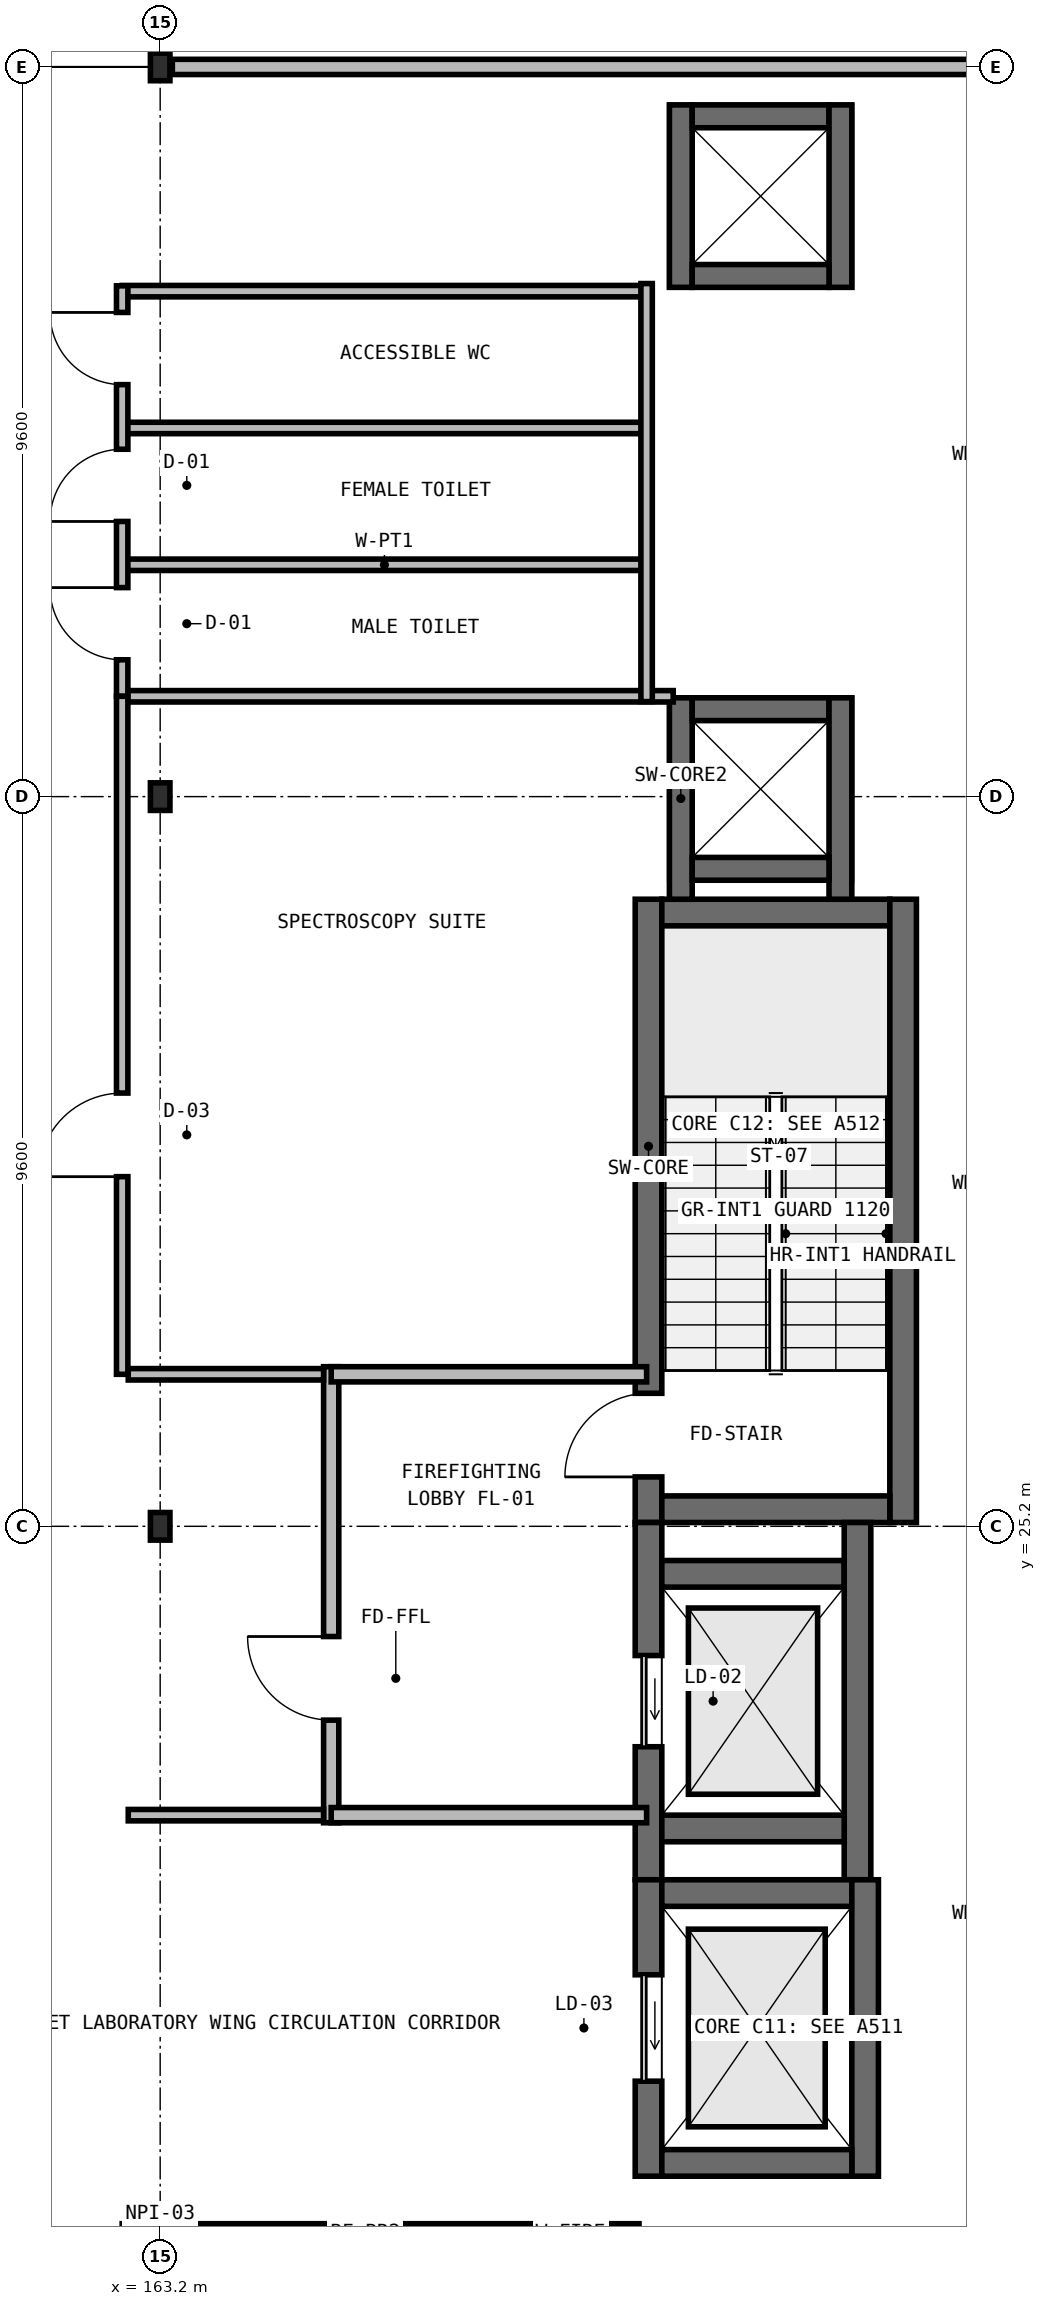
"""IFC4 building model, lengths in metres.
Left out: names, types, materials, properties, quantities, classifications, styles, units other than length and angle.
Written with IfcOpenShell. Run it as: python <this file> out.ifc"""

import sys

from ifc_helpers import new_model, si_unit, direction, frame, frame_2d, origin, origin_2d, place, context, subcontext, project, spatial, rectangle, i_section, extrude, element, fill, save


model = new_model("IFC4")
c1 = context("Model", 3, precision=1e-05, world=origin(), true_north=direction((0.0, 1.0)))
c2 = subcontext(c1, "Body", "Model", "MODEL_VIEW")
j1 = project(units=[si_unit("LENGTHUNIT", "METRE"), si_unit("PLANEANGLEUNIT", "RADIAN")], contexts=[c1])
p1 = place(None, origin())
s1 = spatial("IfcSite", under=j1, at=p1, CompositionType="ELEMENT")
p2 = place(p1, origin())
s2 = spatial("IfcBuilding", under=s1, at=p2, CompositionType="ELEMENT")
p3 = place(p2, frame((0.0, 0.0, 28.0)))
s3 = spatial("IfcBuildingStorey", under=s2, at=p3, CompositionType="ELEMENT", Elevation=28.0)
p4 = place(p3, frame((169.625, 25.25, 0.0), z_axis=(0.0, 0.0, 1.0), x_axis=(0.0, 1.0, 0.0)))
e1 = element("IfcWall", 1, at=p4, inside=s3, PredefinedType="SHEAR", context=c2, shape_type="SweptSolid", body=[
    extrude(rectangle(XDim=8.2, YDim=0.35, at=frame_2d((4.1, 0.0))), origin(), (0.0, 0.0, 1.0), 4.55),
])
p5 = place(p4, frame((0.6, 0.0, 0.0)))
e2 = element("IfcOpeningElement", 2, at=p5, cuts=e1, PredefinedType="OPENING", context=c2, shape_type="SweptSolid", body=[
    extrude(rectangle(XDim=1.1, YDim=2.15, at=frame_2d((0.55, 1.075))), frame((0.0, 0.185, 0.0), z_axis=(0.0, -1.0, 0.0), x_axis=(1.0, 0.0, 0.0)), (0.0, 0.0, 1.0), 0.37),
])
p6 = place(p3, frame((169.8, 33.275, 0.0), z_axis=(0.0, 0.0, 1.0), x_axis=(1.0, 0.0, 0.0)))
e3 = element("IfcWall", 3, at=p6, inside=s3, PredefinedType="SHEAR", context=c2, shape_type="SweptSolid", body=[
    extrude(rectangle(XDim=3.0, YDim=0.35, at=frame_2d((1.5, 0.0))), origin(), (0.0, 0.0, 1.0), 4.55),
])
p7 = place(p3, frame((172.975, 33.45, 0.0), z_axis=(0.0, 0.0, 1.0), x_axis=(0.0, -1.0, 0.0)))
e4 = element("IfcWall", 4, at=p7, inside=s3, PredefinedType="SHEAR", context=c2, shape_type="SweptSolid", body=[
    extrude(rectangle(XDim=8.2, YDim=0.35, at=frame_2d((4.1, 0.0))), origin(), (0.0, 0.0, 1.0), 4.55),
])
p8 = place(p3, frame((172.8, 25.425, 0.0), z_axis=(0.0, 0.0, 1.0), x_axis=(-1.0, 0.0, 0.0)))
e5 = element("IfcWall", 5, at=p8, inside=s3, PredefinedType="SHEAR", context=c2, shape_type="SweptSolid", body=[
    extrude(rectangle(XDim=3.0, YDim=0.35, at=frame_2d((1.5, 0.0))), origin(), (0.0, 0.0, 1.0), 4.55),
])
p9 = place(p3, frame((169.625, 20.55, 0.0), z_axis=(0.0, 0.0, 1.0), x_axis=(0.0, 1.0, 0.0)))
e6 = element("IfcWall", 6, at=p9, inside=s3, PredefinedType="SHEAR", context=c2, shape_type="SweptSolid", body=[
    extrude(rectangle(XDim=4.7, YDim=0.35, at=frame_2d((2.35, 0.0))), origin(), (0.0, 0.0, 1.0), 4.55),
])
p10 = place(p9, frame((1.75, 0.0, 0.0)))
e7 = element("IfcOpeningElement", 7, at=p10, cuts=e6, PredefinedType="OPENING", context=c2, shape_type="SweptSolid", body=[
    extrude(rectangle(XDim=1.2, YDim=2.15, at=frame_2d((0.6, 1.075))), frame((0.0, 0.185, 0.0), z_axis=(0.0, -1.0, 0.0), x_axis=(1.0, 0.0, 0.0)), (0.0, 0.0, 1.0), 0.37),
])
p11 = place(p3, frame((169.8, 24.575, 0.0), z_axis=(0.0, 0.0, 1.0), x_axis=(1.0, 0.0, 0.0)))
e8 = element("IfcWall", 8, at=p11, inside=s3, PredefinedType="SHEAR", context=c2, shape_type="SweptSolid", body=[
    extrude(rectangle(XDim=2.4, YDim=0.35, at=frame_2d((1.2, 0.0))), origin(), (0.0, 0.0, 1.0), 4.55),
])
p12 = place(p3, frame((172.375, 25.25, 0.0), z_axis=(0.0, 0.0, 1.0), x_axis=(0.0, -1.0, 0.0)))
e9 = element("IfcWall", 9, at=p12, inside=s3, PredefinedType="SHEAR", context=c2, shape_type="SweptSolid", body=[
    extrude(rectangle(XDim=4.7, YDim=0.35, at=frame_2d((2.35, 0.0))), origin(), (0.0, 0.0, 1.0), 4.55),
])
p13 = place(p3, frame((172.2, 21.225, 0.0), z_axis=(0.0, 0.0, 1.0), x_axis=(-1.0, 0.0, 0.0)))
e10 = element("IfcWall", 10, at=p13, inside=s3, PredefinedType="SHEAR", context=c2, shape_type="SweptSolid", body=[
    extrude(rectangle(XDim=2.4, YDim=0.35, at=frame_2d((1.2, 0.0))), origin(), (0.0, 0.0, 1.0), 4.55),
])
p14 = place(p3, frame((169.625, 16.65, 0.0), z_axis=(0.0, 0.0, 1.0), x_axis=(0.0, 1.0, 0.0)))
e11 = element("IfcWall", 11, at=p14, inside=s3, PredefinedType="SHEAR", context=c2, shape_type="SweptSolid", body=[
    extrude(rectangle(XDim=3.9, YDim=0.35, at=frame_2d((1.95, 0.0))), origin(), (0.0, 0.0, 1.0), 4.55),
])
p15 = place(p14, frame((1.25, 0.0, 0.0)))
e12 = element("IfcOpeningElement", 12, at=p15, cuts=e11, PredefinedType="OPENING", context=c2, shape_type="SweptSolid", body=[
    extrude(rectangle(XDim=1.4, YDim=2.3, at=frame_2d((0.7, 1.15))), frame((0.0, 0.185, 0.0), z_axis=(0.0, -1.0, 0.0), x_axis=(1.0, 0.0, 0.0)), (0.0, 0.0, 1.0), 0.37),
])
p16 = place(p3, frame((169.8, 20.375, 0.0), z_axis=(0.0, 0.0, 1.0), x_axis=(1.0, 0.0, 0.0)))
e13 = element("IfcWall", 13, at=p16, inside=s3, PredefinedType="SHEAR", context=c2, shape_type="SweptSolid", body=[
    extrude(rectangle(XDim=2.5, YDim=0.35, at=frame_2d((1.25, 0.0))), origin(), (0.0, 0.0, 1.0), 4.55),
])
p17 = place(p3, frame((172.475, 20.55, 0.0), z_axis=(0.0, 0.0, 1.0), x_axis=(0.0, -1.0, 0.0)))
e14 = element("IfcWall", 14, at=p17, inside=s3, PredefinedType="SHEAR", context=c2, shape_type="SweptSolid", body=[
    extrude(rectangle(XDim=3.9, YDim=0.35, at=frame_2d((1.95, 0.0))), origin(), (0.0, 0.0, 1.0), 4.55),
])
p18 = place(p3, frame((172.3, 16.825, 0.0), z_axis=(0.0, 0.0, 1.0), x_axis=(-1.0, 0.0, 0.0)))
e15 = element("IfcWall", 15, at=p18, inside=s3, PredefinedType="SHEAR", context=c2, shape_type="SweptSolid", body=[
    extrude(rectangle(XDim=2.5, YDim=0.35, at=frame_2d((1.25, 0.0))), origin(), (0.0, 0.0, 1.0), 4.55),
])
for number, where, z_axis, x_axis in (
    (16, (163.2, 25.2, 0.0), (0.0, 0.0, 1.0), (1.0, 0.0, 0.0)),
    (17, (163.2, 34.8, 0.0), (0.0, 0.0, 1.0), (1.0, 0.0, 0.0)),
    (18, (163.2, 44.4, 0.0), (0.0, 0.0, 1.0), (1.0, 0.0, 0.0)),
):
    element("IfcColumn", number, at=place(p3, frame(where, z_axis=z_axis, x_axis=x_axis)), inside=s3, PredefinedType="COLUMN", context=c2, shape_type="SweptSolid", body=[
        extrude(i_section(OverallWidth=0.257, OverallDepth=0.363, WebThickness=0.013, FlangeThickness=0.022, at=origin_2d()), origin(), (0.0, 0.0, 1.0), 4.55),
    ])
p19 = place(p3, frame((170.05, 33.45, 0.0), z_axis=(0.0, 0.0, 1.0), x_axis=(0.0, 1.0, 0.0)))
e19 = element("IfcWall", 19, at=p19, inside=s3, PredefinedType="SHEAR", context=c2, shape_type="SweptSolid", body=[
    extrude(rectangle(XDim=2.65, YDim=0.3, at=frame_2d((1.325, 0.0))), origin(), (0.0, 0.0, 1.0), 4.37),
])
p20 = place(p3, frame((170.2, 35.95, 0.0), z_axis=(0.0, 0.0, 1.0), x_axis=(1.0, 0.0, 0.0)))
e20 = element("IfcWall", 20, at=p20, inside=s3, PredefinedType="SHEAR", context=c2, shape_type="SweptSolid", body=[
    extrude(rectangle(XDim=1.8, YDim=0.3, at=frame_2d((0.9, 0.0))), origin(), (0.0, 0.0, 1.0), 4.37),
])
p21 = place(p3, frame((172.15, 36.1, 0.0), z_axis=(0.0, 0.0, 1.0), x_axis=(0.0, -1.0, 0.0)))
e21 = element("IfcWall", 21, at=p21, inside=s3, PredefinedType="SHEAR", context=c2, shape_type="SweptSolid", body=[
    extrude(rectangle(XDim=2.65, YDim=0.3, at=frame_2d((1.325, 0.0))), origin(), (0.0, 0.0, 1.0), 4.37),
])
p22 = place(p3, frame((172.0, 33.85, 0.0), z_axis=(0.0, 0.0, 1.0), x_axis=(-1.0, 0.0, 0.0)))
e22 = element("IfcWall", 22, at=p22, inside=s3, PredefinedType="SHEAR", context=c2, shape_type="SweptSolid", body=[
    extrude(rectangle(XDim=1.8, YDim=0.3, at=frame_2d((0.9, 0.0))), origin(), (0.0, 0.0, 1.0), 4.37),
])
p23 = place(p3, frame((170.05, 41.5, 0.0), z_axis=(0.0, 0.0, 1.0), x_axis=(0.0, 1.0, 0.0)))
e23 = element("IfcWall", 23, at=p23, inside=s3, PredefinedType="SHEAR", context=c2, shape_type="SweptSolid", body=[
    extrude(rectangle(XDim=2.4, YDim=0.3, at=frame_2d((1.2, 0.0))), origin(), (0.0, 0.0, 1.0), 4.37),
])
p24 = place(p3, frame((170.2, 43.75, 0.0), z_axis=(0.0, 0.0, 1.0), x_axis=(1.0, 0.0, 0.0)))
e24 = element("IfcWall", 24, at=p24, inside=s3, PredefinedType="SHEAR", context=c2, shape_type="SweptSolid", body=[
    extrude(rectangle(XDim=1.8, YDim=0.3, at=frame_2d((0.9, 0.0))), origin(), (0.0, 0.0, 1.0), 4.37),
])
p25 = place(p3, frame((172.15, 43.9, 0.0), z_axis=(0.0, 0.0, 1.0), x_axis=(0.0, -1.0, 0.0)))
e25 = element("IfcWall", 25, at=p25, inside=s3, PredefinedType="SHEAR", context=c2, shape_type="SweptSolid", body=[
    extrude(rectangle(XDim=2.4, YDim=0.3, at=frame_2d((1.2, 0.0))), origin(), (0.0, 0.0, 1.0), 4.37),
])
p26 = place(p3, frame((172.0, 41.65, 0.0), z_axis=(0.0, 0.0, 1.0), x_axis=(-1.0, 0.0, 0.0)))
e26 = element("IfcWall", 26, at=p26, inside=s3, PredefinedType="SHEAR", context=c2, shape_type="SweptSolid", body=[
    extrude(rectangle(XDim=1.8, YDim=0.3, at=frame_2d((0.9, 0.0))), origin(), (0.0, 0.0, 1.0), 4.37),
])
p27 = place(p3, frame((163.36, 44.4, 0.0), z_axis=(0.0, 0.0, 1.0), x_axis=(1.0, 0.0, 0.0)))
e27 = element("IfcWall", 27, at=p27, inside=s3, PredefinedType="SOLIDWALL", context=c2, shape_type="SweptSolid", body=[
    extrude(rectangle(XDim=10.48, YDim=0.2, at=frame_2d((5.24, 0.0))), origin(), (0.0, 0.0, 1.0), 3.753),
])
p28 = place(p3, frame((165.45, 21.3, 0.0), z_axis=(0.0, 0.0, 1.0), x_axis=(0.0, 1.0, 0.0)))
e28 = element("IfcWall", 28, at=p28, inside=s3, PredefinedType="SOLIDWALL", context=c2, shape_type="SweptSolid", body=[
    extrude(rectangle(XDim=6.0, YDim=0.2, at=frame_2d((3.0, 0.0))), origin(), (0.0, 0.0, 1.0), 4.3),
])
p29 = place(p28, frame((1.35, 0.0, 0.0)))
e29 = element("IfcOpeningElement", 29, at=p29, cuts=e28, PredefinedType="OPENING", context=c2, shape_type="SweptSolid", body=[
    extrude(rectangle(XDim=1.1, YDim=2.15, at=frame_2d((0.55, 1.075))), frame((0.0, 0.11, 0.0), z_axis=(0.0, -1.0, 0.0), x_axis=(1.0, 0.0, 0.0)), (0.0, 0.0, 1.0), 0.22),
])
for number, where, z_axis, x_axis in (
    (30, (165.45, 21.4, 0.0), (0.0, 0.0, 1.0), (1.0, 0.0, 0.0)),
    (31, (165.45, 27.2, 0.0), (0.0, 0.0, 1.0), (1.0, 0.0, 0.0)),
):
    element("IfcWall", number, at=place(p3, frame(where, z_axis=z_axis, x_axis=x_axis)), inside=s3, PredefinedType="SOLIDWALL", context=c2, shape_type="SweptSolid", body=[
        extrude(rectangle(XDim=4.15, YDim=0.2, at=frame_2d((2.075, 0.0))), origin(), (0.0, 0.0, 1.0), 4.3),
    ])
for number, where, z_axis, x_axis in (
    (32, (162.7, 37.85, 0.0), (0.0, 0.0, 1.0), (1.0, 0.0, 0.0)),
    (33, (162.7, 39.65, 0.0), (0.0, 0.0, 1.0), (1.0, 0.0, 0.0)),
    (34, (162.7, 41.45, 0.0), (0.0, 0.0, 1.0), (1.0, 0.0, 0.0)),
):
    element("IfcWall", number, at=place(p3, frame(where, z_axis=z_axis, x_axis=x_axis)), inside=s3, PredefinedType="PARTITIONING", context=c2, shape_type="SweptSolid", body=[
        extrude(rectangle(XDim=6.9, YDim=0.15, at=frame_2d((3.45, 0.0))), origin(), (0.0, 0.0, 1.0), 4.3),
    ])
p30 = place(p3, frame((162.7, 36.12, 0.0), z_axis=(0.0, 0.0, 1.0), x_axis=(1.0, 0.0, 0.0)))
e35 = element("IfcWall", 35, at=p30, inside=s3, PredefinedType="PARTITIONING", context=c2, shape_type="SweptSolid", body=[
    extrude(rectangle(XDim=7.25, YDim=0.15, at=frame_2d((3.625, 0.0))), origin(), (0.0, 0.0, 1.0), 4.3),
])
p31 = place(p3, frame((169.6, 36.05, 0.0), z_axis=(0.0, 0.0, 1.0), x_axis=(0.0, 1.0, 0.0)))
e36 = element("IfcWall", 36, at=p31, inside=s3, PredefinedType="PARTITIONING", context=c2, shape_type="SweptSolid", body=[
    extrude(rectangle(XDim=5.5, YDim=0.15, at=frame_2d((2.75, 0.0))), origin(), (0.0, 0.0, 1.0), 4.3),
])
p32 = place(p3, frame((162.7, 36.12, 0.0), z_axis=(0.0, 0.0, 1.0), x_axis=(0.0, 1.0, 0.0)))
e37 = element("IfcWall", 37, at=p32, inside=s3, PredefinedType="PARTITIONING", context=c2, shape_type="SweptSolid", body=[
    extrude(rectangle(XDim=5.4, YDim=0.15, at=frame_2d((2.7, 0.0))), origin(), (0.0, 0.0, 1.0), 4.3),
])
p33 = place(p32, frame((0.48, 0.0, 0.0)))
e38 = element("IfcOpeningElement", 38, at=p33, cuts=e37, PredefinedType="OPENING", context=c2, shape_type="SweptSolid", body=[
    extrude(rectangle(XDim=0.95, YDim=2.1, at=frame_2d((0.475, 1.05))), frame((0.0, 0.085, 0.0), z_axis=(0.0, -1.0, 0.0), x_axis=(1.0, 0.0, 0.0)), (0.0, 0.0, 1.0), 0.17),
])
p34 = place(p32, frame((2.3, 0.0, 0.0)))
e39 = element("IfcOpeningElement", 39, at=p34, cuts=e37, PredefinedType="OPENING", context=c2, shape_type="SweptSolid", body=[
    extrude(rectangle(XDim=0.95, YDim=2.1, at=frame_2d((0.475, 1.05))), frame((0.0, 0.085, 0.0), z_axis=(0.0, -1.0, 0.0), x_axis=(1.0, 0.0, 0.0)), (0.0, 0.0, 1.0), 0.17),
])
p35 = place(p32, frame((4.1, 0.0, 0.0)))
e40 = element("IfcOpeningElement", 40, at=p35, cuts=e37, PredefinedType="OPENING", context=c2, shape_type="SweptSolid", body=[
    extrude(rectangle(XDim=0.95, YDim=2.1, at=frame_2d((0.475, 1.05))), frame((0.0, 0.085, 0.0), z_axis=(0.0, -1.0, 0.0), x_axis=(1.0, 0.0, 0.0)), (0.0, 0.0, 1.0), 0.17),
])
p36 = place(p3, frame((162.78, 27.2, 0.0), z_axis=(0.0, 0.0, 1.0), x_axis=(1.0, 0.0, 0.0)))
e41 = element("IfcWall", 41, at=p36, inside=s3, PredefinedType="PARTITIONING", context=c2, shape_type="SweptSolid", body=[
    extrude(rectangle(XDim=2.57, YDim=0.15, at=frame_2d((1.285, 0.0))), origin(), (0.0, 0.0, 1.0), 4.3),
])
p37 = place(p3, frame((162.7, 27.2, 0.0), z_axis=(0.0, 0.0, 1.0), x_axis=(0.0, 1.0, 0.0)))
e42 = element("IfcWall", 42, at=p37, inside=s3, PredefinedType="PARTITIONING", context=c2, shape_type="SweptSolid", body=[
    extrude(rectangle(XDim=8.92, YDim=0.15, at=frame_2d((4.46, 0.0))), origin(), (0.0, 0.0, 1.0), 4.3),
])
p38 = place(p37, frame((2.6, 0.0, 0.0)))
e43 = element("IfcOpeningElement", 43, at=p38, cuts=e42, PredefinedType="OPENING", context=c2, shape_type="SweptSolid", body=[
    extrude(rectangle(XDim=1.1, YDim=2.2, at=frame_2d((0.55, 1.1))), frame((0.0, 0.085, 0.0), z_axis=(0.0, -1.0, 0.0), x_axis=(1.0, 0.0, 0.0)), (0.0, 0.0, 1.0), 0.17),
])
p39 = place(p3, frame((162.78, 21.4, 0.0), z_axis=(0.0, 0.0, 1.0), x_axis=(1.0, 0.0, 0.0)))
e44 = element("IfcWall", 44, at=p39, inside=s3, PredefinedType="PARTITIONING", context=c2, shape_type="SweptSolid", body=[
    extrude(rectangle(XDim=2.57, YDim=0.15, at=frame_2d((1.285, 0.0))), origin(), (0.0, 0.0, 1.0), 4.3),
])
p40 = place(p3, frame((162.7, 15.95, 0.0), z_axis=(0.0, 0.0, 1.0), x_axis=(1.0, 0.0, 0.0)))
e45 = element("IfcWall", 45, at=p40, inside=s3, PredefinedType="PARTITIONING", context=c2, shape_type="SweptSolid", body=[
    extrude(rectangle(XDim=6.8, YDim=0.15, at=frame_2d((3.4, 0.0))), origin(), (0.0, 0.0, 1.0), 4.3),
])
p41 = place(p5, origin())
e46 = element("IfcDoor", 46, at=p41, inside=s3, OperationType="SINGLE_SWING_LEFT", PredefinedType="DOOR", context=c2, shape_type="SweptSolid", body=[
    extrude(rectangle(XDim=1.1, YDim=2.15, at=frame_2d((0.55, 1.075))), frame((0.0, 0.025, 0.0), z_axis=(0.0, -1.0, 0.0), x_axis=(1.0, 0.0, 0.0)), (0.0, 0.0, 1.0), 0.05),
])
fill(e2, e46)
p42 = place(p10, origin())
e47 = element("IfcDoor", 47, at=p42, inside=s3, OperationType="SLIDING_TO_LEFT", PredefinedType="USERDEFINED", context=c2, shape_type="SweptSolid", body=[
    extrude(rectangle(XDim=1.2, YDim=2.15, at=frame_2d((0.6, 1.075))), frame((0.0, 0.025, 0.0), z_axis=(0.0, -1.0, 0.0), x_axis=(1.0, 0.0, 0.0)), (0.0, 0.0, 1.0), 0.05),
])
fill(e7, e47)
p43 = place(p15, origin())
e48 = element("IfcDoor", 48, at=p43, inside=s3, OperationType="SLIDING_TO_LEFT", PredefinedType="USERDEFINED", context=c2, shape_type="SweptSolid", body=[
    extrude(rectangle(XDim=1.4, YDim=2.3, at=frame_2d((0.7, 1.15))), frame((0.0, 0.025, 0.0), z_axis=(0.0, -1.0, 0.0), x_axis=(1.0, 0.0, 0.0)), (0.0, 0.0, 1.0), 0.05),
])
fill(e12, e48)
p44 = place(p29, origin())
e49 = element("IfcDoor", 49, at=p44, inside=s3, OperationType="SINGLE_SWING_RIGHT", PredefinedType="DOOR", context=c2, shape_type="SweptSolid", body=[
    extrude(rectangle(XDim=1.1, YDim=2.15, at=frame_2d((0.55, 1.075))), frame((0.0, 0.025, 0.0), z_axis=(0.0, -1.0, 0.0), x_axis=(1.0, 0.0, 0.0)), (0.0, 0.0, 1.0), 0.05),
])
fill(e29, e49)
p45 = place(p33, origin())
e50 = element("IfcDoor", 50, at=p45, inside=s3, OperationType="SINGLE_SWING_RIGHT", PredefinedType="DOOR", context=c2, shape_type="SweptSolid", body=[
    extrude(rectangle(XDim=0.95, YDim=2.1, at=frame_2d((0.475, 1.05))), frame((0.0, 0.025, 0.0), z_axis=(0.0, -1.0, 0.0), x_axis=(1.0, 0.0, 0.0)), (0.0, 0.0, 1.0), 0.05),
])
fill(e38, e50)
p46 = place(p34, origin())
e51 = element("IfcDoor", 51, at=p46, inside=s3, OperationType="SINGLE_SWING_LEFT", PredefinedType="DOOR", context=c2, shape_type="SweptSolid", body=[
    extrude(rectangle(XDim=0.95, YDim=2.1, at=frame_2d((0.475, 1.05))), frame((0.0, 0.025, 0.0), z_axis=(0.0, -1.0, 0.0), x_axis=(1.0, 0.0, 0.0)), (0.0, 0.0, 1.0), 0.05),
])
fill(e39, e51)
p47 = place(p35, origin())
e52 = element("IfcDoor", 52, at=p47, inside=s3, OperationType="SINGLE_SWING_RIGHT", PredefinedType="DOOR", context=c2, shape_type="SweptSolid", body=[
    extrude(rectangle(XDim=0.95, YDim=2.1, at=frame_2d((0.475, 1.05))), frame((0.0, 0.025, 0.0), z_axis=(0.0, -1.0, 0.0), x_axis=(1.0, 0.0, 0.0)), (0.0, 0.0, 1.0), 0.05),
])
fill(e40, e52)
p48 = place(p38, origin())
e53 = element("IfcDoor", 53, at=p48, inside=s3, OperationType="SINGLE_SWING_LEFT", PredefinedType="DOOR", context=c2, shape_type="SweptSolid", body=[
    extrude(rectangle(XDim=1.1, YDim=2.2, at=frame_2d((0.55, 1.1))), frame((0.0, 0.025, 0.0), z_axis=(0.0, -1.0, 0.0), x_axis=(1.0, 0.0, 0.0)), (0.0, 0.0, 1.0), 0.05),
])
fill(e43, e53)
save(model, sys.argv[1])
